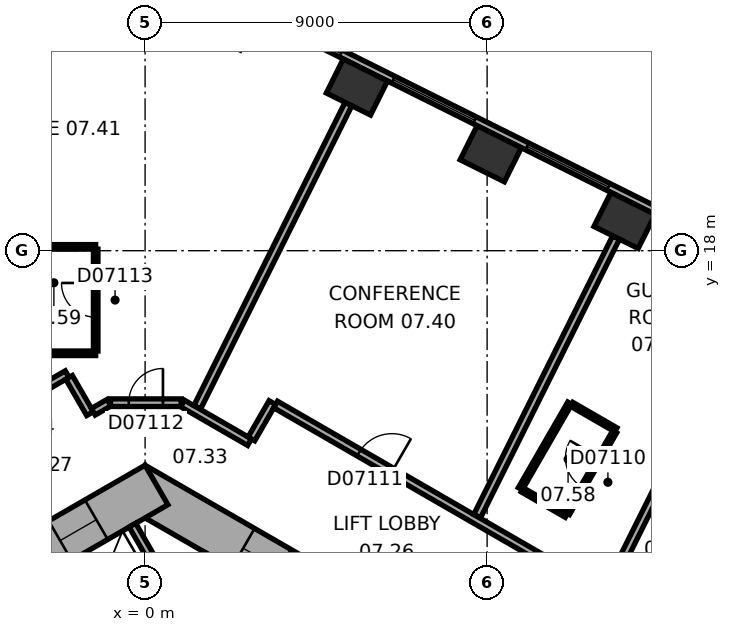
"""IFC4 building model, lengths in metres.
Left out: names, types, materials, properties, quantities, classifications, styles, units other than length and angle.
Written with IfcOpenShell. Run it as: python <this file> out.ifc"""

import sys

from ifc_helpers import new_model, si_unit, direction, frame, frame_2d, origin, origin_2d, place, context, subcontext, project, spatial, rectangle, extrude, element, fill, save


model = new_model("IFC4")
c1 = context("Model", 3, precision=1e-05, world=origin(), true_north=direction((0.0, 1.0)))
c2 = subcontext(c1, "Body", "Model", "MODEL_VIEW")
j1 = project(units=[si_unit("LENGTHUNIT", "METRE"), si_unit("PLANEANGLEUNIT", "RADIAN")], contexts=[c1])
p1 = place(None, origin())
s1 = spatial("IfcSite", under=j1, at=p1, CompositionType="ELEMENT")
p2 = place(p1, origin())
s2 = spatial("IfcBuilding", under=s1, at=p2, CompositionType="ELEMENT")
p3 = place(p2, frame((0.0, 0.0, 44.0)))
s3 = spatial("IfcBuildingStorey", under=s2, at=p3, CompositionType="ELEMENT", Elevation=44.0)
for number, where, z_axis, x_axis in (
    (1, (12.616, 18.795, 0.0), (0.0, 0.0, 1.0), (-0.895, 0.446, 0.0)),
    (2, (9.095, 20.551, 0.0), (0.0, 0.0, 1.0), (-0.895, 0.446, 0.0)),
    (3, (5.574, 22.306, 0.0), (0.0, 0.0, 1.0), (-0.895, 0.446, 0.0)),
):
    element("IfcColumn", number, at=place(p3, frame(where, z_axis=z_axis, x_axis=x_axis)), inside=s3, PredefinedType="COLUMN", context=c2, shape_type="SweptSolid", body=[
        extrude(rectangle(XDim=1.3, YDim=1.0, at=origin_2d()), origin(), (0.0, 0.0, 1.0), 3.3),
    ])
p4 = place(p3, frame((10.4, 5.658, 0.0), z_axis=(0.0, 0.0, 1.0), x_axis=(-0.866021384402, 0.500006961711, 0.0)))
e4 = element("IfcWall", 4, at=p4, inside=s3, PredefinedType="SHEAR", context=c2, shape_type="SweptSolid", body=[
    extrude(rectangle(XDim=12.355, YDim=1.2, at=frame_2d((6.178, 0.0))), origin(), (0.0, 0.0, 1.0), 3.3),
])
p5 = place(p4, frame((2.728, 0.0, 0.0)))
e5 = element("IfcOpeningElement", 5, at=p5, cuts=e4, PredefinedType="OPENING", context=c2, shape_type="SweptSolid", body=[
    extrude(rectangle(XDim=1.1, YDim=2.1, at=frame_2d((0.55, 1.05))), frame((0.0, 0.61, 0.0), z_axis=(0.0, -1.0, 0.0), x_axis=(1.0, 0.0, 0.0)), (0.0, 0.0, 1.0), 1.22),
])
p6 = place(p4, frame((5.328, 0.0, 0.0)))
e6 = element("IfcOpeningElement", 6, at=p6, cuts=e4, PredefinedType="OPENING", context=c2, shape_type="SweptSolid", body=[
    extrude(rectangle(XDim=1.1, YDim=2.1, at=frame_2d((0.55, 1.05))), frame((0.0, 0.61, 0.0), z_axis=(0.0, -1.0, 0.0), x_axis=(1.0, 0.0, 0.0)), (0.0, 0.0, 1.0), 1.22),
])
p7 = place(p4, frame((7.928, 0.0, 0.0)))
e7 = element("IfcOpeningElement", 7, at=p7, cuts=e4, PredefinedType="OPENING", context=c2, shape_type="SweptSolid", body=[
    extrude(rectangle(XDim=1.1, YDim=2.1, at=frame_2d((0.55, 1.05))), frame((0.0, 0.61, 0.0), z_axis=(0.0, -1.0, 0.0), x_axis=(1.0, 0.0, 0.0)), (0.0, 0.0, 1.0), 1.22),
])
p8 = place(p3, frame((0.3, 11.836, 0.0), z_axis=(0.0, 0.0, 1.0), x_axis=(-0.866021384402, -0.500006961711, 0.0)))
e8 = element("IfcWall", 8, at=p8, inside=s3, PredefinedType="SHEAR", context=c2, shape_type="SweptSolid", body=[
    extrude(rectangle(XDim=12.355, YDim=1.2, at=frame_2d((6.178, 0.0))), origin(), (0.0, 0.0, 1.0), 3.3),
])
p9 = place(p8, frame((6.378, 0.0, 0.0)))
e9 = element("IfcOpeningElement", 9, at=p9, cuts=e8, PredefinedType="OPENING", context=c2, shape_type="SweptSolid", body=[
    extrude(rectangle(XDim=1.5, YDim=2.1, at=frame_2d((0.75, 1.05))), frame((0.0, 0.61, 0.0), z_axis=(0.0, -1.0, 0.0), x_axis=(1.0, 0.0, 0.0)), (0.0, 0.0, 1.0), 1.22),
])
p10 = place(p8, frame((1.828, 0.0, 0.0)))
e10 = element("IfcOpeningElement", 10, at=p10, cuts=e8, PredefinedType="OPENING", context=c2, shape_type="SweptSolid", body=[
    extrude(rectangle(XDim=1.1, YDim=2.1, at=frame_2d((0.55, 1.05))), frame((0.0, 0.61, 0.0), z_axis=(0.0, -1.0, 0.0), x_axis=(1.0, 0.0, 0.0)), (0.0, 0.0, 1.0), 1.22),
])
p11 = place(p3, frame((20.63, 15.47, 0.0), z_axis=(0.0, 0.0, 1.0), x_axis=(-0.894934518609, 0.446197498203, 0.0)))
e11 = element("IfcWall", 11, at=p11, inside=s3, PredefinedType="STANDARD", context=c2, shape_type="SweptSolid", body=[
    extrude(rectangle(XDim=21.246, YDim=0.2, at=frame_2d((10.623, 0.0))), origin(), (0.0, 0.0, 1.0), 3.3),
])
p12 = place(p11, frame((1.553, 0.0, 0.8)))
e12 = element("IfcOpeningElement", 12, at=p12, cuts=e11, PredefinedType="OPENING", context=c2, shape_type="SweptSolid", body=[
    extrude(rectangle(XDim=2.4, YDim=1.7, at=frame_2d((1.2, 0.85))), frame((0.0, 0.11, 0.0), z_axis=(0.0, -1.0, 0.0), x_axis=(1.0, 0.0, 0.0)), (0.0, 0.0, 1.0), 0.22),
])
p13 = place(p11, frame((5.488, 0.0, 0.8)))
e13 = element("IfcOpeningElement", 13, at=p13, cuts=e11, PredefinedType="OPENING", context=c2, shape_type="SweptSolid", body=[
    extrude(rectangle(XDim=2.4, YDim=1.7, at=frame_2d((1.2, 0.85))), frame((0.0, 0.11, 0.0), z_axis=(0.0, -1.0, 0.0), x_axis=(1.0, 0.0, 0.0)), (0.0, 0.0, 1.0), 0.22),
])
p14 = place(p11, frame((9.422, 0.0, 0.8)))
e14 = element("IfcOpeningElement", 14, at=p14, cuts=e11, PredefinedType="OPENING", context=c2, shape_type="SweptSolid", body=[
    extrude(rectangle(XDim=2.4, YDim=1.7, at=frame_2d((1.2, 0.85))), frame((0.0, 0.11, 0.0), z_axis=(0.0, -1.0, 0.0), x_axis=(1.0, 0.0, 0.0)), (0.0, 0.0, 1.0), 0.22),
])
p15 = place(p11, frame((13.357, 0.0, 0.8)))
e15 = element("IfcOpeningElement", 15, at=p15, cuts=e11, PredefinedType="OPENING", context=c2, shape_type="SweptSolid", body=[
    extrude(rectangle(XDim=2.4, YDim=1.7, at=frame_2d((1.2, 0.85))), frame((0.0, 0.11, 0.0), z_axis=(0.0, -1.0, 0.0), x_axis=(1.0, 0.0, 0.0)), (0.0, 0.0, 1.0), 0.22),
])
p16 = place(p11, frame((17.292, 0.0, 0.8)))
e16 = element("IfcOpeningElement", 16, at=p16, cuts=e11, PredefinedType="OPENING", context=c2, shape_type="SweptSolid", body=[
    extrude(rectangle(XDim=2.4, YDim=1.7, at=frame_2d((1.2, 0.85))), frame((0.0, 0.11, 0.0), z_axis=(0.0, -1.0, 0.0), x_axis=(1.0, 0.0, 0.0)), (0.0, 0.0, 1.0), 0.22),
])
p17 = place(p3, frame((0.532, 8.122, 0.0), z_axis=(0.0, 0.0, 1.0), x_axis=(0.500077893725, 0.86598042715, 0.0)))
e17 = element("IfcWall", 17, at=p17, inside=s3, PredefinedType="PARTITIONING", context=c2, shape_type="SweptSolid", body=[
    extrude(rectangle(XDim=2.2, YDim=0.2, at=frame_2d((1.1, 0.0))), origin(), (0.0, 0.0, 1.0), 3.05),
])
p18 = place(p3, frame((0.767, 8.872, 0.0), z_axis=(0.0, 0.0, 1.0), x_axis=(-0.499994660107, 0.866028486751, 0.0)))
e18 = element("IfcWall", 18, at=p18, inside=s3, PredefinedType="PARTITIONING", context=c2, shape_type="SweptSolid", body=[
    extrude(rectangle(XDim=2.2, YDim=0.2, at=frame_2d((1.1, 0.0))), origin(), (0.0, 0.0, 1.0), 3.05),
])
p19 = place(p3, frame((-3.44, 18.101, 0.0), z_axis=(0.0, 0.0, 1.0), x_axis=(1.0, 0.0, 0.0)))
e19 = element("IfcWall", 19, at=p19, inside=s3, PredefinedType="PARTITIONING", context=c2, shape_type="SweptSolid", body=[
    extrude(rectangle(XDim=2.14, YDim=0.12, at=frame_2d((1.07, 0.0))), origin(), (0.0, 0.0, 1.0), 3.05),
])
p20 = place(p3, frame((-2.05, 14.752, 0.0), z_axis=(0.0, 0.0, 1.0), x_axis=(-0.866030936828, -0.499990416364, 0.0)))
e20 = element("IfcWall", 20, at=p20, inside=s3, PredefinedType="PARTITIONING", context=c2, shape_type="SweptSolid", body=[
    extrude(rectangle(XDim=3.102, YDim=0.2, at=frame_2d((1.551, 0.0))), origin(), (0.0, 0.0, 1.0), 3.05),
])
p21 = place(p20, frame((1.419, 0.0, 0.0)))
e21 = element("IfcOpeningElement", 21, at=p21, cuts=e20, PredefinedType="OPENING", context=c2, shape_type="SweptSolid", body=[
    extrude(rectangle(XDim=0.9, YDim=2.1, at=frame_2d((0.45, 1.05))), frame((0.0, 0.11, 0.0), z_axis=(0.0, -1.0, 0.0), x_axis=(1.0, 0.0, 0.0)), (0.0, 0.0, 1.0), 0.22),
])
p22 = place(p3, frame((-1.449, 13.712, 0.0), z_axis=(0.0, 0.0, 1.0), x_axis=(-0.499978356969, 0.866037899034, 0.0)))
e22 = element("IfcWall", 22, at=p22, inside=s3, PredefinedType="PARTITIONING", context=c2, shape_type="SweptSolid", body=[
    extrude(rectangle(XDim=1.101, YDim=0.2, at=frame_2d((0.551, 0.0))), origin(), (0.0, 0.0, 1.0), 3.05),
])
p23 = place(p3, frame((-1.3, 15.301, 0.0), z_axis=(0.0, 0.0, 1.0), x_axis=(-1.0, 0.0, 0.0)))
e23 = element("IfcWall", 23, at=p23, inside=s3, PredefinedType="PARTITIONING", context=c2, shape_type="SweptSolid", body=[
    extrude(rectangle(XDim=1.661, YDim=0.12, at=frame_2d((0.831, 0.0))), origin(), (0.0, 0.0, 1.0), 3.05),
])
p24 = place(p3, frame((-1.3, 18.041, 0.0), z_axis=(0.0, 0.0, 1.0), x_axis=(0.0, -1.0, 0.0)))
e24 = element("IfcWall", 24, at=p24, inside=s3, PredefinedType="PARTITIONING", context=c2, shape_type="SweptSolid", body=[
    extrude(rectangle(XDim=2.68, YDim=0.12, at=frame_2d((1.34, 0.0))), origin(), (0.0, 0.0, 1.0), 3.05),
])
p25 = place(p24, frame((0.89, 0.0, 0.0)))
e25 = element("IfcOpeningElement", 25, at=p25, cuts=e24, PredefinedType="OPENING", context=c2, shape_type="SweptSolid", body=[
    extrude(rectangle(XDim=0.9, YDim=2.1, at=frame_2d((0.45, 1.05))), frame((0.0, 0.07, 0.0), z_axis=(0.0, -1.0, 0.0), x_axis=(1.0, 0.0, 0.0)), (0.0, 0.0, 1.0), 0.14),
])
p26 = place(p3, frame((-0.95, 14.001, 0.0), z_axis=(0.0, 0.0, 1.0), x_axis=(-0.86609177584, -0.499885022602, 0.0)))
e26 = element("IfcWall", 26, at=p26, inside=s3, PredefinedType="PARTITIONING", context=c2, shape_type="SweptSolid", body=[
    extrude(rectangle(XDim=0.477, YDim=0.2, at=frame_2d((0.238, 0.0))), origin(), (0.0, 0.0, 1.0), 3.05),
])
p27 = place(p3, frame((0.95, 14.001, 0.0), z_axis=(0.0, 0.0, 1.0), x_axis=(-1.0, 0.0, 0.0)))
e27 = element("IfcWall", 27, at=p27, inside=s3, PredefinedType="PARTITIONING", context=c2, shape_type="SweptSolid", body=[
    extrude(rectangle(XDim=1.86, YDim=0.2, at=frame_2d((0.93, 0.0))), origin(), (0.0, 0.0, 1.0), 3.05),
])
p28 = place(p27, frame((0.48, 0.0, 0.0)))
e28 = element("IfcOpeningElement", 28, at=p28, cuts=e27, PredefinedType="OPENING", context=c2, shape_type="SweptSolid", body=[
    extrude(rectangle(XDim=0.9, YDim=2.1, at=frame_2d((0.45, 1.05))), frame((0.0, 0.11, 0.0), z_axis=(0.0, -1.0, 0.0), x_axis=(1.0, 0.0, 0.0)), (0.0, 0.0, 1.0), 0.22),
])
p29 = place(p3, frame((2.748, 12.962, 0.0), z_axis=(0.0, 0.0, 1.0), x_axis=(-0.866013897511, 0.50001992892, 0.0)))
e29 = element("IfcWall", 29, at=p29, inside=s3, PredefinedType="PARTITIONING", context=c2, shape_type="SweptSolid", body=[
    extrude(rectangle(XDim=2.037, YDim=0.2, at=frame_2d((1.018, 0.0))), origin(), (0.0, 0.0, 1.0), 3.05),
])
p30 = place(p3, frame((3.349, 14.002, 0.0), z_axis=(0.0, 0.0, 1.0), x_axis=(-0.500074377092, -0.865982457891, 0.0)))
e30 = element("IfcWall", 30, at=p30, inside=s3, PredefinedType="PARTITIONING", context=c2, shape_type="SweptSolid", body=[
    extrude(rectangle(XDim=1.101, YDim=0.2, at=frame_2d((0.55, 0.0))), origin(), (0.0, 0.0, 1.0), 3.05),
])
p31 = place(p3, frame((5.351, 21.859, 0.0), z_axis=(0.0, 0.0, 1.0), x_axis=(-0.446205309328, -0.894930624086, 0.0)))
e31 = element("IfcWall", 31, at=p31, inside=s3, PredefinedType="PARTITIONING", context=c2, shape_type="SweptSolid", body=[
    extrude(rectangle(XDim=8.913, YDim=0.2, at=frame_2d((4.457, 0.0))), origin(), (0.0, 0.0, 1.0), 2.6),
])
p32 = place(p3, frame((9.875, 11.736, 0.0), z_axis=(0.0, 0.0, 1.0), x_axis=(0.499936506574, 0.866062058628, 0.0)))
e32 = element("IfcWall", 32, at=p32, inside=s3, PredefinedType="PARTITIONING", context=c2, shape_type="SweptSolid", body=[
    extrude(rectangle(XDim=2.6, YDim=0.12, at=frame_2d((1.3, 0.0))), origin(), (0.0, 0.0, 1.0), 3.05),
])
p33 = place(p3, frame((10.885, 9.652, 0.0), z_axis=(0.0, 0.0, 1.0), x_axis=(-0.866033868542, 0.499985338323, 0.0)))
e33 = element("IfcWall", 33, at=p33, inside=s3, PredefinedType="PARTITIONING", context=c2, shape_type="SweptSolid", body=[
    extrude(rectangle(XDim=8.602, YDim=0.2, at=frame_2d((4.301, 0.0))), origin(), (0.0, 0.0, 1.0), 3.05),
])
p34 = place(p33, frame((5.069, 0.0, 0.0)))
e34 = element("IfcOpeningElement", 34, at=p34, cuts=e33, PredefinedType="OPENING", context=c2, shape_type="SweptSolid", body=[
    extrude(rectangle(XDim=1.0, YDim=2.1, at=frame_2d((0.5, 1.05))), frame((0.0, 0.11, 0.0), z_axis=(0.0, -1.0, 0.0), x_axis=(1.0, 0.0, 0.0)), (0.0, 0.0, 1.0), 0.22),
])
for number, where, z_axis, x_axis in (
    (35, (11.087, 11.036, 0.0), (0.0, 0.0, 1.0), (-0.866, 0.5, 0.0)),
    (36, (11.226, 13.958, 0.0), (0.0, 0.0, 1.0), (0.866, -0.5, 0.0)),
):
    element("IfcWall", number, at=place(p3, frame(where, z_axis=z_axis, x_axis=x_axis)), inside=s3, PredefinedType="PARTITIONING", context=c2, shape_type="SweptSolid", body=[
        extrude(rectangle(XDim=1.34, YDim=0.12, at=frame_2d((0.67, 0.0))), origin(), (0.0, 0.0, 1.0), 3.05),
    ])
p35 = place(p3, frame((12.357, 13.236, 0.0), z_axis=(0.0, 0.0, 1.0), x_axis=(-0.50000366821, -0.866023285932, 0.0)))
e37 = element("IfcWall", 37, at=p35, inside=s3, PredefinedType="PARTITIONING", context=c2, shape_type="SweptSolid", body=[
    extrude(rectangle(XDim=2.48, YDim=0.12, at=frame_2d((1.24, 0.0))), origin(), (0.0, 0.0, 1.0), 3.05),
])
p36 = place(p35, frame((0.79, 0.0, 0.0)))
e38 = element("IfcOpeningElement", 38, at=p36, cuts=e37, PredefinedType="OPENING", context=c2, shape_type="SweptSolid", body=[
    extrude(rectangle(XDim=0.9, YDim=2.1, at=frame_2d((0.45, 1.05))), frame((0.0, 0.07, 0.0), z_axis=(0.0, -1.0, 0.0), x_axis=(1.0, 0.0, 0.0)), (0.0, 0.0, 1.0), 0.14),
])
p37 = place(p3, frame((12.393, 18.348, 0.0), z_axis=(0.0, 0.0, 1.0), x_axis=(-0.446176022699, -0.894945225569, 0.0)))
e39 = element("IfcWall", 39, at=p37, inside=s3, PredefinedType="PARTITIONING", context=c2, shape_type="SweptSolid", body=[
    extrude(rectangle(XDim=8.191, YDim=0.2, at=frame_2d((4.095, 0.0))), origin(), (0.0, 0.0, 1.0), 2.6),
])
p38 = place(p3, frame((14.974, 10.146, 0.0), z_axis=(0.0, 0.0, 1.0), x_axis=(-0.86599746015, -0.500048396672, 0.0)))
e40 = element("IfcWall", 40, at=p38, inside=s3, PredefinedType="PARTITIONING", context=c2, shape_type="SweptSolid", body=[
    extrude(rectangle(XDim=2.68, YDim=0.12, at=frame_2d((1.34, 0.0))), origin(), (0.0, 0.0, 1.0), 3.05),
])
p39 = place(p38, frame((0.69, 0.0, 0.0)))
e41 = element("IfcOpeningElement", 41, at=p39, cuts=e40, PredefinedType="OPENING", context=c2, shape_type="SweptSolid", body=[
    extrude(rectangle(XDim=0.9, YDim=2.1, at=frame_2d((0.45, 1.05))), frame((0.0, 0.07, 0.0), z_axis=(0.0, -1.0, 0.0), x_axis=(1.0, 0.0, 0.0)), (0.0, 0.0, 1.0), 0.14),
])
p40 = place(p3, frame((15.915, 16.592, 0.0), z_axis=(0.0, 0.0, 1.0), x_axis=(-0.446199736347, -0.894933402709, 0.0)))
e42 = element("IfcWall", 42, at=p40, inside=s3, PredefinedType="PARTITIONING", context=c2, shape_type="SweptSolid", body=[
    extrude(rectangle(XDim=9.635, YDim=0.2, at=frame_2d((4.817, 0.0))), origin(), (0.0, 0.0, 1.0), 3.05),
])
p41 = place(p14, origin())
e43 = element("IfcWindow", 43, at=p41, inside=s3, PartitioningType="SINGLE_PANEL", PredefinedType="WINDOW", context=c2, shape_type="SweptSolid", body=[
    extrude(rectangle(XDim=2.4, YDim=1.7, at=frame_2d((1.2, 0.85))), frame((0.0, 0.03, 0.0), z_axis=(0.0, -1.0, 0.0), x_axis=(1.0, 0.0, 0.0)), (0.0, 0.0, 1.0), 0.06),
])
fill(e14, e43)
p42 = place(p15, origin())
e44 = element("IfcWindow", 44, at=p42, inside=s3, PartitioningType="SINGLE_PANEL", PredefinedType="WINDOW", context=c2, shape_type="SweptSolid", body=[
    extrude(rectangle(XDim=2.4, YDim=1.7, at=frame_2d((1.2, 0.85))), frame((0.0, 0.03, 0.0), z_axis=(0.0, -1.0, 0.0), x_axis=(1.0, 0.0, 0.0)), (0.0, 0.0, 1.0), 0.06),
])
fill(e15, e44)
p43 = place(p16, origin())
e45 = element("IfcWindow", 45, at=p43, inside=s3, PartitioningType="SINGLE_PANEL", PredefinedType="WINDOW", context=c2, shape_type="SweptSolid", body=[
    extrude(rectangle(XDim=2.4, YDim=1.7, at=frame_2d((1.2, 0.85))), frame((0.0, 0.03, 0.0), z_axis=(0.0, -1.0, 0.0), x_axis=(1.0, 0.0, 0.0)), (0.0, 0.0, 1.0), 0.06),
])
fill(e16, e45)
p44 = place(p7, origin())
e46 = element("IfcDoor", 46, at=p44, inside=s3, OperationType="DOUBLE_DOOR_SLIDING", PredefinedType="DOOR", context=c2, shape_type="SweptSolid", body=[
    extrude(rectangle(XDim=1.1, YDim=2.1, at=frame_2d((0.55, 1.05))), frame((0.0, 0.025, 0.0), z_axis=(0.0, -1.0, 0.0), x_axis=(1.0, 0.0, 0.0)), (0.0, 0.0, 1.0), 0.05),
])
fill(e7, e46)
p45 = place(p10, origin())
e47 = element("IfcDoor", 47, at=p45, inside=s3, OperationType="DOUBLE_DOOR_SLIDING", PredefinedType="DOOR", context=c2, shape_type="SweptSolid", body=[
    extrude(rectangle(XDim=1.1, YDim=2.1, at=frame_2d((0.55, 1.05))), frame((0.0, 0.025, 0.0), z_axis=(0.0, -1.0, 0.0), x_axis=(1.0, 0.0, 0.0)), (0.0, 0.0, 1.0), 0.05),
])
fill(e10, e47)
p46 = place(p36, origin())
e48 = element("IfcDoor", 48, at=p46, inside=s3, OperationType="SINGLE_SWING_LEFT", PredefinedType="DOOR", context=c2, shape_type="SweptSolid", body=[
    extrude(rectangle(XDim=0.9, YDim=2.1, at=frame_2d((0.45, 1.05))), frame((0.0, 0.025, 0.0), z_axis=(0.0, -1.0, 0.0), x_axis=(1.0, 0.0, 0.0)), (0.0, 0.0, 1.0), 0.05),
])
fill(e38, e48)
p47 = place(p34, origin())
e49 = element("IfcDoor", 49, at=p47, inside=s3, OperationType="SINGLE_SWING_LEFT", PredefinedType="DOOR", context=c2, shape_type="SweptSolid", body=[
    extrude(rectangle(XDim=1.0, YDim=2.1, at=frame_2d((0.5, 1.05))), frame((0.0, 0.025, 0.0), z_axis=(0.0, -1.0, 0.0), x_axis=(1.0, 0.0, 0.0)), (0.0, 0.0, 1.0), 0.05),
])
fill(e34, e49)
p48 = place(p28, origin())
e50 = element("IfcDoor", 50, at=p48, inside=s3, OperationType="SINGLE_SWING_LEFT", PredefinedType="DOOR", context=c2, shape_type="SweptSolid", body=[
    extrude(rectangle(XDim=0.9, YDim=2.1, at=frame_2d((0.45, 1.05))), frame((0.0, 0.025, 0.0), z_axis=(0.0, -1.0, 0.0), x_axis=(1.0, 0.0, 0.0)), (0.0, 0.0, 1.0), 0.05),
])
fill(e28, e50)
p49 = place(p25, origin())
e51 = element("IfcDoor", 51, at=p49, inside=s3, OperationType="SINGLE_SWING_LEFT", PredefinedType="DOOR", context=c2, shape_type="SweptSolid", body=[
    extrude(rectangle(XDim=0.9, YDim=2.1, at=frame_2d((0.45, 1.05))), frame((0.0, 0.025, 0.0), z_axis=(0.0, -1.0, 0.0), x_axis=(1.0, 0.0, 0.0)), (0.0, 0.0, 1.0), 0.05),
])
fill(e25, e51)
save(model, sys.argv[1])
